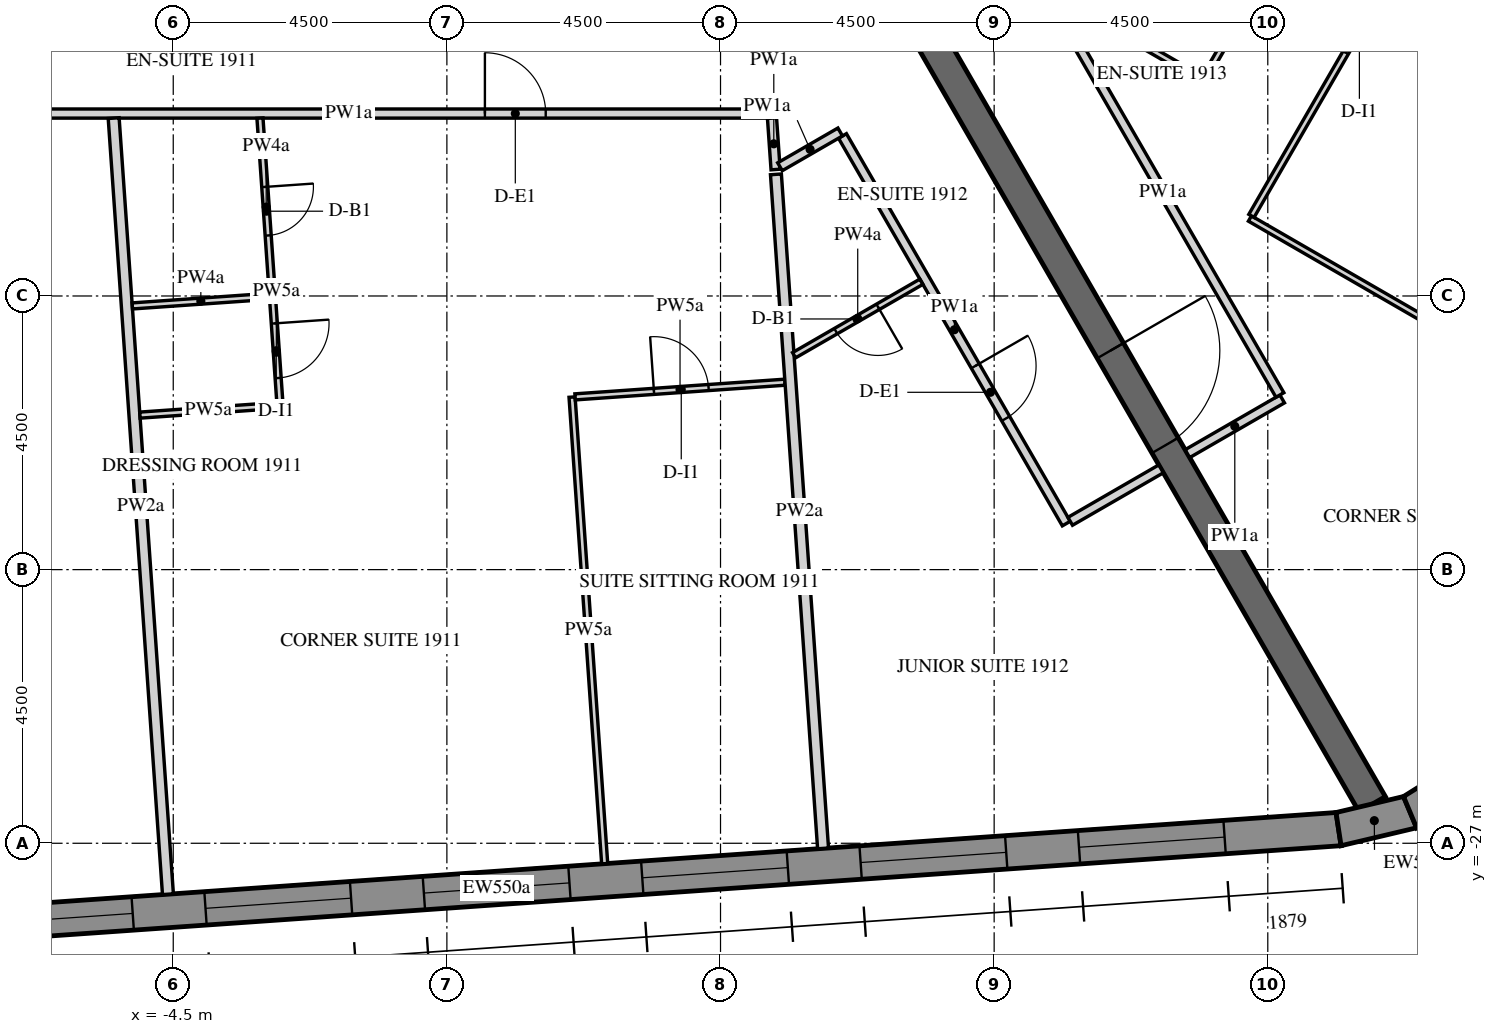
"""IFC4 building model, lengths in metres.
Left out: names, types, materials, properties, quantities, classifications, styles, units other than length and angle.
Written with IfcOpenShell. Run it as: python <this file> out.ifc"""

import sys

from ifc_helpers import new_model, si_unit, direction, frame, frame_2d, origin, place, context, subcontext, project, spatial, polyline, rectangle, outline, extrude, element, fill, save


model = new_model("IFC4")
c1 = context("Model", 3, precision=1e-05, world=origin(), true_north=direction((0.0, 1.0)))
c2 = subcontext(c1, "Body", "Model", "MODEL_VIEW")
j1 = project(units=[si_unit("LENGTHUNIT", "METRE"), si_unit("PLANEANGLEUNIT", "RADIAN")], contexts=[c1])
p1 = place(None, origin())
s1 = spatial("IfcSite", under=j1, at=p1, CompositionType="ELEMENT")
p2 = place(p1, origin())
s2 = spatial("IfcBuilding", under=s1, at=p2, CompositionType="ELEMENT")
p3 = place(p2, frame((0.0, 0.0, 246.3)))
s3 = spatial("IfcBuildingStorey", under=s2, at=p3, CompositionType="ELEMENT", Elevation=246.3)
p4 = place(p3, frame((-13.026, -28.704, -0.15), z_axis=(0.0, 0.0, 1.0), x_axis=(0.99756406806, 0.069756219185, 0.0)))
e1 = element("IfcWall", 1, at=p4, inside=s3, PredefinedType="SOLIDWALL", context=c2, shape_type="SweptSolid", body=[
    extrude(outline(polyline([(-0.026, -0.275), (27.78, -0.275), (27.735, 0.275), (0.026, 0.275), (-0.026, -0.275)])), origin(), (0.0, 0.0, 1.0), 3.75),
])
p5 = place(p4, frame((1.879, 0.0, 1.05)))
e2 = element("IfcOpeningElement", 2, at=p5, cuts=e1, PredefinedType="OPENING", context=c2, shape_type="SweptSolid", body=[
    extrude(rectangle(XDim=2.4, YDim=2.4, at=frame_2d((1.2, 1.2))), frame((0.0, 0.285, 0.0), z_axis=(0.0, -1.0, 0.0), x_axis=(1.0, 0.0, 0.0)), (0.0, 0.0, 1.0), 0.57),
])
p6 = place(p4, frame((5.479, 0.0, 1.05)))
e3 = element("IfcOpeningElement", 3, at=p6, cuts=e1, PredefinedType="OPENING", context=c2, shape_type="SweptSolid", body=[
    extrude(rectangle(XDim=2.4, YDim=2.4, at=frame_2d((1.2, 1.2))), frame((0.0, 0.285, 0.0), z_axis=(0.0, -1.0, 0.0), x_axis=(1.0, 0.0, 0.0)), (0.0, 0.0, 1.0), 0.57),
])
p7 = place(p4, frame((9.079, 0.0, 1.05)))
e4 = element("IfcOpeningElement", 4, at=p7, cuts=e1, PredefinedType="OPENING", context=c2, shape_type="SweptSolid", body=[
    extrude(rectangle(XDim=2.4, YDim=2.4, at=frame_2d((1.2, 1.2))), frame((0.0, 0.285, 0.0), z_axis=(0.0, -1.0, 0.0), x_axis=(1.0, 0.0, 0.0)), (0.0, 0.0, 1.0), 0.57),
])
p8 = place(p4, frame((12.679, 0.0, 1.05)))
e5 = element("IfcOpeningElement", 5, at=p8, cuts=e1, PredefinedType="OPENING", context=c2, shape_type="SweptSolid", body=[
    extrude(rectangle(XDim=2.4, YDim=2.4, at=frame_2d((1.2, 1.2))), frame((0.0, 0.285, 0.0), z_axis=(0.0, -1.0, 0.0), x_axis=(1.0, 0.0, 0.0)), (0.0, 0.0, 1.0), 0.57),
])
p9 = place(p4, frame((16.279, 0.0, 1.05)))
e6 = element("IfcOpeningElement", 6, at=p9, cuts=e1, PredefinedType="OPENING", context=c2, shape_type="SweptSolid", body=[
    extrude(rectangle(XDim=2.4, YDim=2.4, at=frame_2d((1.2, 1.2))), frame((0.0, 0.285, 0.0), z_axis=(0.0, -1.0, 0.0), x_axis=(1.0, 0.0, 0.0)), (0.0, 0.0, 1.0), 0.57),
])
p10 = place(p4, frame((19.879, 0.0, 1.05)))
e7 = element("IfcOpeningElement", 7, at=p10, cuts=e1, PredefinedType="OPENING", context=c2, shape_type="SweptSolid", body=[
    extrude(rectangle(XDim=2.4, YDim=2.4, at=frame_2d((1.2, 1.2))), frame((0.0, 0.285, 0.0), z_axis=(0.0, -1.0, 0.0), x_axis=(1.0, 0.0, 0.0)), (0.0, 0.0, 1.0), 0.57),
])
p11 = place(p4, frame((23.479, 0.0, 1.05)))
e8 = element("IfcOpeningElement", 8, at=p11, cuts=e1, PredefinedType="OPENING", context=c2, shape_type="SweptSolid", body=[
    extrude(rectangle(XDim=2.4, YDim=2.4, at=frame_2d((1.2, 1.2))), frame((0.0, 0.285, 0.0), z_axis=(0.0, -1.0, 0.0), x_axis=(1.0, 0.0, 0.0)), (0.0, 0.0, 1.0), 0.57),
])
p12 = place(p3, frame((14.664, -26.767, -0.15), z_axis=(0.0, 0.0, 1.0), x_axis=(0.973063591128, 0.230536868247, 0.0)))
e9 = element("IfcWall", 9, at=p12, inside=s3, PredefinedType="SOLIDWALL", context=c2, shape_type="SweptSolid", body=[
    extrude(outline(polyline([(-0.022, -0.275), (1.253, -0.275), (1.163, 0.275), (0.022, 0.275), (-0.022, -0.275)])), origin(), (0.0, 0.0, 1.0), 3.75),
])
p13 = place(p3, frame((15.84, -26.489, -0.15), z_axis=(0.0, 0.0, 1.0), x_axis=(0.848009655012, 0.52998077796, 0.0)))
e10 = element("IfcWall", 10, at=p13, inside=s3, PredefinedType="SOLIDWALL", context=c2, shape_type="SweptSolid", body=[
    extrude(outline(polyline([(-0.045, -0.275), (1.253, -0.275), (1.163, 0.275), (0.045, 0.275), (-0.045, -0.275)])), origin(), (0.0, 0.0, 1.0), 3.75),
])
p14 = place(p3, frame((7.506, -13.0, -0.15), z_axis=(0.0, 0.0, 1.0), x_axis=(0.499988271576, -0.866032175087, 0.0)))
e11 = element("IfcWall", 11, at=p14, inside=s3, PredefinedType="SHEAR", context=c2, shape_type="SweptSolid", body=[
    extrude(rectangle(XDim=15.424, YDim=0.5, at=frame_2d((7.712, 0.0))), origin(), (0.0, 0.0, 1.0), 3.75),
])
p15 = place(p14, frame((6.812, 0.0, 0.15)))
e12 = element("IfcOpeningElement", 12, at=p15, cuts=e11, PredefinedType="OPENING", context=c2, shape_type="SweptSolid", body=[
    extrude(rectangle(XDim=1.8, YDim=2.4, at=frame_2d((0.9, 1.2))), frame((0.0, 0.26, 0.0), z_axis=(0.0, -1.0, 0.0), x_axis=(1.0, 0.0, 0.0)), (0.0, 0.0, 1.0), 0.52),
])
p16 = place(p3, frame((-8.574, -15.0, 0.0), z_axis=(0.0, 0.0, 1.0), x_axis=(1.0, 0.0, 0.0)))
e13 = element("IfcWall", 13, at=p16, inside=s3, PredefinedType="PARTITIONING", context=c2, shape_type="SweptSolid", body=[
    extrude(rectangle(XDim=13.915, YDim=0.15, at=frame_2d((6.958, 0.0))), origin(), (0.0, 0.0, 1.0), 2.838),
])
p17 = place(p16, frame((1.001, 0.0, 0.0)))
e14 = element("IfcOpeningElement", 14, at=p17, cuts=e13, PredefinedType="OPENING", context=c2, shape_type="SweptSolid", body=[
    extrude(rectangle(XDim=1.0, YDim=2.1, at=frame_2d((0.5, 1.05))), frame((0.0, 0.085, 0.0), z_axis=(0.0, -1.0, 0.0), x_axis=(1.0, 0.0, 0.0)), (0.0, 0.0, 1.0), 0.17),
])
p18 = place(p16, frame((9.199, 0.0, 0.0)))
e15 = element("IfcOpeningElement", 15, at=p18, cuts=e13, PredefinedType="OPENING", context=c2, shape_type="SweptSolid", body=[
    extrude(rectangle(XDim=1.0, YDim=2.1, at=frame_2d((0.5, 1.05))), frame((0.0, 0.085, 0.0), z_axis=(0.0, -1.0, 0.0), x_axis=(1.0, 0.0, 0.0)), (0.0, 0.0, 1.0), 0.17),
])
p19 = place(p3, frame((5.347, -15.075, 0.0), z_axis=(0.0, 0.0, 1.0), x_axis=(0.069731635013, -0.997565786842, 0.0)))
e16 = element("IfcWall", 16, at=p19, inside=s3, PredefinedType="PARTITIONING", context=c2, shape_type="SweptSolid", body=[
    extrude(rectangle(XDim=0.847, YDim=0.15, at=frame_2d((0.424, 0.0))), origin(), (0.0, 0.0, 1.0), 2.838),
])
p20 = place(p3, frame((6.506, -15.368, 0.0), z_axis=(0.0, 0.0, 1.0), x_axis=(0.499995202058, -0.86602817386, 0.0)))
e17 = element("IfcWall", 17, at=p20, inside=s3, PredefinedType="PARTITIONING", context=c2, shape_type="SweptSolid", body=[
    extrude(rectangle(XDim=7.361, YDim=0.15, at=frame_2d((3.68, 0.0))), origin(), (0.0, 0.0, 1.0), 2.838),
])
p21 = place(p20, frame((4.368, 0.0, 0.0)))
e18 = element("IfcOpeningElement", 18, at=p21, cuts=e17, PredefinedType="OPENING", context=c2, shape_type="SweptSolid", body=[
    extrude(rectangle(XDim=1.0, YDim=2.1, at=frame_2d((0.5, 1.05))), frame((0.0, 0.085, 0.0), z_axis=(0.0, -1.0, 0.0), x_axis=(1.0, 0.0, 0.0)), (0.0, 0.0, 1.0), 0.17),
])
p22 = place(p3, frame((10.251, -21.705, 0.0), z_axis=(0.0, 0.0, 1.0), x_axis=(0.866013532718, 0.500020560727, 0.0)))
e19 = element("IfcWall", 19, at=p22, inside=s3, PredefinedType="PARTITIONING", context=c2, shape_type="SweptSolid", body=[
    extrude(rectangle(XDim=1.725, YDim=0.15, at=frame_2d((0.863, 0.0))), origin(), (0.0, 0.0, 1.0), 2.838),
])
p23 = place(p3, frame((5.478, -15.875, 0.0), z_axis=(0.0, 0.0, 1.0), x_axis=(0.866000689289, 0.500042804318, 0.0)))
e20 = element("IfcWall", 20, at=p23, inside=s3, PredefinedType="PARTITIONING", context=c2, shape_type="SweptSolid", body=[
    extrude(rectangle(XDim=1.144, YDim=0.15, at=frame_2d((0.572, 0.0))), origin(), (0.0, 0.0, 1.0), 2.838),
])
p24 = place(p3, frame((12.178, -20.593, 0.0), z_axis=(0.0, 0.0, 1.0), x_axis=(0.866047807691, 0.499961193289, 0.0)))
e21 = element("IfcWall", 21, at=p24, inside=s3, PredefinedType="PARTITIONING", context=c2, shape_type="SweptSolid", body=[
    extrude(rectangle(XDim=1.8, YDim=0.15, at=frame_2d((0.9, 0.0))), origin(), (0.0, 0.0, 1.0), 2.838),
])
p25 = place(p3, frame((13.699, -19.628, 0.0), z_axis=(0.0, 0.0, 1.0), x_axis=(-0.499993780622, 0.866028994514, 0.0)))
e22 = element("IfcWall", 22, at=p25, inside=s3, PredefinedType="PARTITIONING", context=c2, shape_type="SweptSolid", body=[
    extrude(rectangle(XDim=7.711, YDim=0.15, at=frame_2d((3.855, 0.0))), origin(), (0.0, 0.0, 1.0), 2.838),
])
p26 = place(p3, frame((-4.587, -27.838, 0.0), z_axis=(0.0, 0.0, 1.0), x_axis=(-0.069764754112, 0.997563471206, 0.0)))
e23 = element("IfcWall", 23, at=p26, inside=s3, PredefinedType="PARTITIONING", context=c2, shape_type="SweptSolid", body=[
    extrude(rectangle(XDim=12.794, YDim=0.18, at=frame_2d((6.397, 0.0))), origin(), (0.0, 0.0, 1.0), 2.838),
])
p27 = place(p3, frame((-3.074, -15.075, 0.0), z_axis=(0.0, 0.0, 1.0), x_axis=(0.069798496539, -0.99756111085, 0.0)))
e24 = element("IfcWall", 24, at=p27, inside=s3, PredefinedType="PARTITIONING", context=c2, shape_type="SweptSolid", body=[
    extrude(rectangle(XDim=2.935, YDim=0.1, at=frame_2d((1.467, 0.0))), origin(), (0.0, 0.0, 1.0), 2.838),
])
p28 = place(p27, frame((1.135, 0.0, 0.0)))
e25 = element("IfcOpeningElement", 25, at=p28, cuts=e24, PredefinedType="OPENING", context=c2, shape_type="SweptSolid", body=[
    extrude(rectangle(XDim=0.8, YDim=2.1, at=frame_2d((0.4, 1.05))), frame((0.0, 0.06, 0.0), z_axis=(0.0, -1.0, 0.0), x_axis=(1.0, 0.0, 0.0)), (0.0, 0.0, 1.0), 0.12),
])
p29 = place(p3, frame((-2.866, -18.052, 0.0), z_axis=(0.0, 0.0, 1.0), x_axis=(0.069750000204, -0.997564502913, 0.0)))
e26 = element("IfcWall", 26, at=p29, inside=s3, PredefinedType="PARTITIONING", context=c2, shape_type="SweptSolid", body=[
    extrude(rectangle(XDim=1.75, YDim=0.1, at=frame_2d((0.875, 0.0))), origin(), (0.0, 0.0, 1.0), 2.838),
])
p30 = place(p29, frame((0.4, 0.0, 0.0)))
e27 = element("IfcOpeningElement", 27, at=p30, cuts=e26, PredefinedType="OPENING", context=c2, shape_type="SweptSolid", body=[
    extrude(rectangle(XDim=0.9, YDim=2.1, at=frame_2d((0.45, 1.05))), frame((0.0, 0.06, 0.0), z_axis=(0.0, -1.0, 0.0), x_axis=(1.0, 0.0, 0.0)), (0.0, 0.0, 1.0), 0.12),
])
p31 = place(p3, frame((-2.793, -19.802, 0.0), z_axis=(0.0, 0.0, 1.0), x_axis=(-0.997562351999, -0.069780755754, 0.0)))
e28 = element("IfcWall", 28, at=p31, inside=s3, PredefinedType="PARTITIONING", context=c2, shape_type="SweptSolid", body=[
    extrude(rectangle(XDim=2.26, YDim=0.1, at=frame_2d((1.13, 0.0))), origin(), (0.0, 0.0, 1.0), 2.838),
])
p32 = place(p3, frame((2.595, -27.335, 0.0), z_axis=(0.0, 0.0, 1.0), x_axis=(-0.069769427287, 0.997563144375, 0.0)))
e29 = element("IfcWall", 29, at=p32, inside=s3, PredefinedType="PARTITIONING", context=c2, shape_type="SweptSolid", body=[
    extrude(rectangle(XDim=7.691, YDim=0.1, at=frame_2d((3.846, 0.0))), origin(), (0.0, 0.0, 1.0), 2.838),
])
p33 = place(p3, frame((2.109, -19.659, 0.0), z_axis=(0.0, 0.0, 1.0), x_axis=(0.997566776398, 0.069717477193, 0.0)))
e30 = element("IfcWall", 30, at=p33, inside=s3, PredefinedType="PARTITIONING", context=c2, shape_type="SweptSolid", body=[
    extrude(rectangle(XDim=3.46, YDim=0.1, at=frame_2d((1.73, 0.0))), origin(), (0.0, 0.0, 1.0), 2.838),
])
p34 = place(p33, frame((1.3, 0.0, 0.0)))
e31 = element("IfcOpeningElement", 31, at=p34, cuts=e30, PredefinedType="OPENING", context=c2, shape_type="SweptSolid", body=[
    extrude(rectangle(XDim=0.9, YDim=2.1, at=frame_2d((0.45, 1.05))), frame((0.0, 0.06, 0.0), z_axis=(0.0, -1.0, 0.0), x_axis=(1.0, 0.0, 0.0)), (0.0, 0.0, 1.0), 0.12),
])
p35 = place(p3, frame((6.186, -27.084, 0.0), z_axis=(0.0, 0.0, 1.0), x_axis=(-0.069737079037, 0.99756540628, 0.0)))
e32 = element("IfcWall", 32, at=p35, inside=s3, PredefinedType="PARTITIONING", context=c2, shape_type="SweptSolid", body=[
    extrude(rectangle(XDim=11.112, YDim=0.18, at=frame_2d((5.556, 0.0))), origin(), (0.0, 0.0, 1.0), 2.838),
])
p36 = place(p3, frame((-5.174, -18.164, 0.0), z_axis=(0.0, 0.0, 1.0), x_axis=(0.997562351999, 0.069780755754, 0.0)))
e33 = element("IfcWall", 33, at=p36, inside=s3, PredefinedType="PARTITIONING", context=c2, shape_type="SweptSolid", body=[
    extrude(rectangle(XDim=2.26, YDim=0.1, at=frame_2d((1.13, 0.0))), origin(), (0.0, 0.0, 1.0), 2.838),
])
p37 = place(p3, frame((7.803, -17.765, 0.0), z_axis=(0.0, 0.0, 1.0), x_axis=(-0.865997239347, -0.500048779063, 0.0)))
e34 = element("IfcWall", 34, at=p37, inside=s3, PredefinedType="PARTITIONING", context=c2, shape_type="SweptSolid", body=[
    extrude(rectangle(XDim=2.418, YDim=0.1, at=frame_2d((1.209, 0.0))), origin(), (0.0, 0.0, 1.0), 2.838),
])
p38 = place(p37, frame((0.825, 0.0, 0.0)))
e35 = element("IfcOpeningElement", 35, at=p38, cuts=e34, PredefinedType="OPENING", context=c2, shape_type="SweptSolid", body=[
    extrude(rectangle(XDim=0.8, YDim=2.1, at=frame_2d((0.4, 1.05))), frame((0.0, 0.06, 0.0), z_axis=(0.0, -1.0, 0.0), x_axis=(1.0, 0.0, 0.0)), (0.0, 0.0, 1.0), 0.12),
])
p39 = place(p3, frame((13.717, -12.242, 0.0), z_axis=(0.0, 0.0, 1.0), x_axis=(-0.499990435942, -0.866030925526, 0.0)))
e36 = element("IfcWall", 36, at=p39, inside=s3, PredefinedType="PARTITIONING", context=c2, shape_type="SweptSolid", body=[
    extrude(rectangle(XDim=2.55, YDim=0.1, at=frame_2d((1.275, 0.0))), origin(), (0.0, 0.0, 1.0), 2.838),
])
p40 = place(p3, frame((12.399, -14.425, 0.0), z_axis=(0.0, 0.0, 1.0), x_axis=(-0.866018616679, 0.500011755427, 0.0)))
e37 = element("IfcWall", 37, at=p40, inside=s3, PredefinedType="PARTITIONING", context=c2, shape_type="SweptSolid", body=[
    extrude(rectangle(XDim=2.8, YDim=0.1, at=frame_2d((1.4, 0.0))), origin(), (0.0, 0.0, 1.0), 2.838),
])
p41 = place(p3, frame((19.831, -20.551, 0.0), z_axis=(0.0, 0.0, 1.0), x_axis=(-0.866025084624, 0.500000552801, 0.0)))
e38 = element("IfcWall", 38, at=p41, inside=s3, PredefinedType="PARTITIONING", context=c2, shape_type="SweptSolid", body=[
    extrude(rectangle(XDim=7.65, YDim=0.1, at=frame_2d((3.825, 0.0))), origin(), (0.0, 0.0, 1.0), 2.838),
])
p42 = place(p3, frame((13.231, -16.683, 0.0), z_axis=(0.0, 0.0, 1.0), x_axis=(0.499995846692, 0.866027801685, 0.0)))
e39 = element("IfcWall", 39, at=p42, inside=s3, PredefinedType="PARTITIONING", context=c2, shape_type="SweptSolid", body=[
    extrude(rectangle(XDim=7.06, YDim=0.1, at=frame_2d((3.53, 0.0))), origin(), (0.0, 0.0, 1.0), 2.838),
])
p43 = place(p42, frame((3.1, 0.0, 0.0)))
e40 = element("IfcOpeningElement", 40, at=p43, cuts=e39, PredefinedType="OPENING", context=c2, shape_type="SweptSolid", body=[
    extrude(rectangle(XDim=0.9, YDim=2.1, at=frame_2d((0.45, 1.05))), frame((0.0, 0.06, 0.0), z_axis=(0.0, -1.0, 0.0), x_axis=(1.0, 0.0, 0.0)), (0.0, 0.0, 1.0), 0.12),
])
p44 = place(p3, frame((23.431, -14.316, 0.0), z_axis=(0.0, 0.0, 1.0), x_axis=(-0.866024931941, 0.500000817256, 0.0)))
e41 = element("IfcWall", 41, at=p44, inside=s3, PredefinedType="PARTITIONING", context=c2, shape_type="SweptSolid", body=[
    extrude(rectangle(XDim=12.375, YDim=0.18, at=frame_2d((6.188, 0.0))), origin(), (0.0, 0.0, 1.0), 2.838),
])
p45 = place(p6, frame((0.0, 0.205, 0.0)))
e42 = element("IfcWindow", 42, at=p45, inside=s3, PartitioningType="DOUBLE_PANEL_VERTICAL", PredefinedType="WINDOW", context=c2, shape_type="SweptSolid", body=[
    extrude(rectangle(XDim=2.4, YDim=2.4, at=frame_2d((1.2, 1.2))), frame((0.0, 0.03, 0.0), z_axis=(0.0, -1.0, 0.0), x_axis=(1.0, 0.0, 0.0)), (0.0, 0.0, 1.0), 0.06),
])
fill(e3, e42)
p46 = place(p7, frame((0.0, 0.205, 0.0)))
e43 = element("IfcWindow", 43, at=p46, inside=s3, PartitioningType="DOUBLE_PANEL_VERTICAL", PredefinedType="WINDOW", context=c2, shape_type="SweptSolid", body=[
    extrude(rectangle(XDim=2.4, YDim=2.4, at=frame_2d((1.2, 1.2))), frame((0.0, 0.03, 0.0), z_axis=(0.0, -1.0, 0.0), x_axis=(1.0, 0.0, 0.0)), (0.0, 0.0, 1.0), 0.06),
])
fill(e4, e43)
p47 = place(p8, frame((0.0, 0.205, 0.0)))
e44 = element("IfcWindow", 44, at=p47, inside=s3, PartitioningType="DOUBLE_PANEL_VERTICAL", PredefinedType="WINDOW", context=c2, shape_type="SweptSolid", body=[
    extrude(rectangle(XDim=2.4, YDim=2.4, at=frame_2d((1.2, 1.2))), frame((0.0, 0.03, 0.0), z_axis=(0.0, -1.0, 0.0), x_axis=(1.0, 0.0, 0.0)), (0.0, 0.0, 1.0), 0.06),
])
fill(e5, e44)
p48 = place(p9, frame((0.0, 0.205, 0.0)))
e45 = element("IfcWindow", 45, at=p48, inside=s3, PartitioningType="DOUBLE_PANEL_VERTICAL", PredefinedType="WINDOW", context=c2, shape_type="SweptSolid", body=[
    extrude(rectangle(XDim=2.4, YDim=2.4, at=frame_2d((1.2, 1.2))), frame((0.0, 0.03, 0.0), z_axis=(0.0, -1.0, 0.0), x_axis=(1.0, 0.0, 0.0)), (0.0, 0.0, 1.0), 0.06),
])
fill(e6, e45)
p49 = place(p10, frame((0.0, 0.205, 0.0)))
e46 = element("IfcWindow", 46, at=p49, inside=s3, PartitioningType="DOUBLE_PANEL_VERTICAL", PredefinedType="WINDOW", context=c2, shape_type="SweptSolid", body=[
    extrude(rectangle(XDim=2.4, YDim=2.4, at=frame_2d((1.2, 1.2))), frame((0.0, 0.03, 0.0), z_axis=(0.0, -1.0, 0.0), x_axis=(1.0, 0.0, 0.0)), (0.0, 0.0, 1.0), 0.06),
])
fill(e7, e46)
p50 = place(p11, frame((0.0, 0.205, 0.0)))
e47 = element("IfcWindow", 47, at=p50, inside=s3, PartitioningType="DOUBLE_PANEL_VERTICAL", PredefinedType="WINDOW", context=c2, shape_type="SweptSolid", body=[
    extrude(rectangle(XDim=2.4, YDim=2.4, at=frame_2d((1.2, 1.2))), frame((0.0, 0.03, 0.0), z_axis=(0.0, -1.0, 0.0), x_axis=(1.0, 0.0, 0.0)), (0.0, 0.0, 1.0), 0.06),
])
fill(e8, e47)
p51 = place(p15, origin())
e48 = element("IfcDoor", 48, at=p51, inside=s3, OperationType="DOUBLE_DOOR_SINGLE_SWING", PredefinedType="DOOR", context=c2, shape_type="SweptSolid", body=[
    extrude(rectangle(XDim=1.8, YDim=2.4, at=frame_2d((0.9, 1.2))), frame((0.0, 0.025, 0.0), z_axis=(0.0, -1.0, 0.0), x_axis=(1.0, 0.0, 0.0)), (0.0, 0.0, 1.0), 0.05),
])
fill(e12, e48)
p52 = place(p18, origin())
e49 = element("IfcDoor", 49, at=p52, inside=s3, OperationType="SINGLE_SWING_RIGHT", PredefinedType="DOOR", context=c2, shape_type="SweptSolid", body=[
    extrude(rectangle(XDim=1.0, YDim=2.1, at=frame_2d((0.5, 1.05))), frame((0.0, 0.025, 0.0), z_axis=(0.0, -1.0, 0.0), x_axis=(1.0, 0.0, 0.0)), (0.0, 0.0, 1.0), 0.05),
])
fill(e15, e49)
p53 = place(p28, origin())
e50 = element("IfcDoor", 50, at=p53, inside=s3, OperationType="SINGLE_SWING_LEFT", PredefinedType="DOOR", context=c2, shape_type="SweptSolid", body=[
    extrude(rectangle(XDim=0.8, YDim=2.1, at=frame_2d((0.4, 1.05))), frame((0.0, 0.025, 0.0), z_axis=(0.0, -1.0, 0.0), x_axis=(1.0, 0.0, 0.0)), (0.0, 0.0, 1.0), 0.05),
])
fill(e25, e50)
p54 = place(p30, origin())
e51 = element("IfcDoor", 51, at=p54, inside=s3, OperationType="SINGLE_SWING_RIGHT", PredefinedType="DOOR", context=c2, shape_type="SweptSolid", body=[
    extrude(rectangle(XDim=0.9, YDim=2.1, at=frame_2d((0.45, 1.05))), frame((0.0, 0.025, 0.0), z_axis=(0.0, -1.0, 0.0), x_axis=(1.0, 0.0, 0.0)), (0.0, 0.0, 1.0), 0.05),
])
fill(e27, e51)
p55 = place(p34, origin())
e52 = element("IfcDoor", 52, at=p55, inside=s3, OperationType="SINGLE_SWING_LEFT", PredefinedType="DOOR", context=c2, shape_type="SweptSolid", body=[
    extrude(rectangle(XDim=0.9, YDim=2.1, at=frame_2d((0.45, 1.05))), frame((0.0, 0.025, 0.0), z_axis=(0.0, -1.0, 0.0), x_axis=(1.0, 0.0, 0.0)), (0.0, 0.0, 1.0), 0.05),
])
fill(e31, e52)
p56 = place(p21, origin())
e53 = element("IfcDoor", 53, at=p56, inside=s3, OperationType="SINGLE_SWING_RIGHT", PredefinedType="DOOR", context=c2, shape_type="SweptSolid", body=[
    extrude(rectangle(XDim=1.0, YDim=2.1, at=frame_2d((0.5, 1.05))), frame((0.0, 0.025, 0.0), z_axis=(0.0, -1.0, 0.0), x_axis=(1.0, 0.0, 0.0)), (0.0, 0.0, 1.0), 0.05),
])
fill(e18, e53)
p57 = place(p38, origin())
e54 = element("IfcDoor", 54, at=p57, inside=s3, OperationType="SINGLE_SWING_LEFT", PredefinedType="DOOR", context=c2, shape_type="SweptSolid", body=[
    extrude(rectangle(XDim=0.8, YDim=2.1, at=frame_2d((0.4, 1.05))), frame((0.0, 0.025, 0.0), z_axis=(0.0, -1.0, 0.0), x_axis=(1.0, 0.0, 0.0)), (0.0, 0.0, 1.0), 0.05),
])
fill(e35, e54)
p58 = place(p43, origin())
e55 = element("IfcDoor", 55, at=p58, inside=s3, OperationType="SINGLE_SWING_LEFT", PredefinedType="DOOR", context=c2, shape_type="SweptSolid", body=[
    extrude(rectangle(XDim=0.9, YDim=2.1, at=frame_2d((0.45, 1.05))), frame((0.0, 0.025, 0.0), z_axis=(0.0, -1.0, 0.0), x_axis=(1.0, 0.0, 0.0)), (0.0, 0.0, 1.0), 0.05),
])
fill(e40, e55)
save(model, sys.argv[1])
